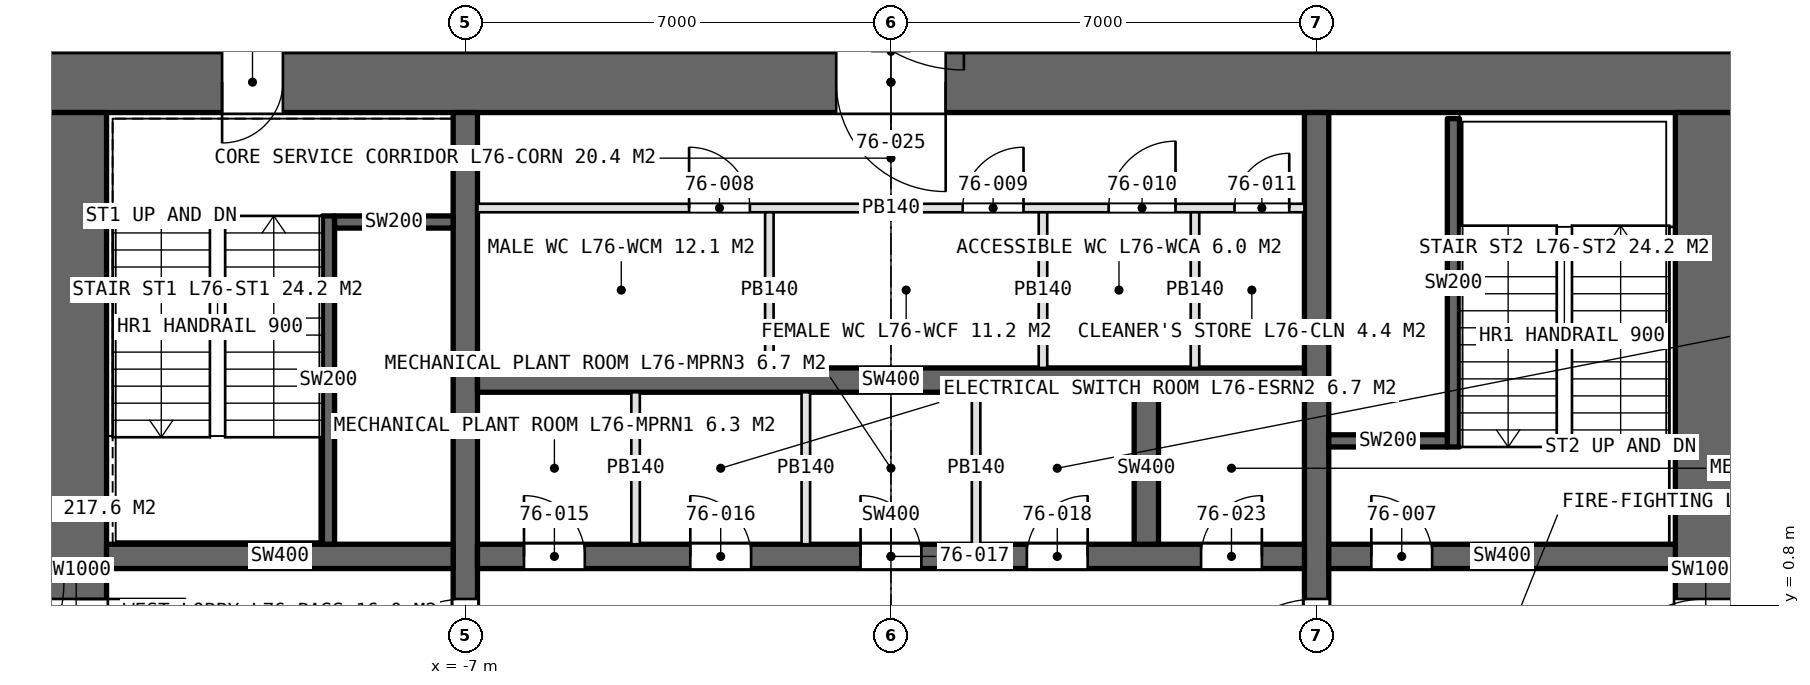
"""IFC4 building model, lengths in metres.
Left out: names, types, materials, properties, quantities, classifications, styles, units other than length and angle.
Written with IfcOpenShell. Run it as: python <this file> out.ifc"""

import sys

from ifc_helpers import new_model, si_unit, direction, frame, frame_2d, origin, place, context, subcontext, project, spatial, rectangle, extrude, element, fill, save


model = new_model("IFC4")
c1 = context("Model", 3, precision=1e-05, world=origin(), true_north=direction((0.0, 1.0)))
c2 = subcontext(c1, "Body", "Model", "MODEL_VIEW")
j1 = project(units=[si_unit("LENGTHUNIT", "METRE"), si_unit("PLANEANGLEUNIT", "RADIAN")], contexts=[c1])
p1 = place(None, origin())
s1 = spatial("IfcSite", under=j1, at=p1, CompositionType="ELEMENT")
p2 = place(p1, origin())
s2 = spatial("IfcBuilding", under=s1, at=p2, CompositionType="ELEMENT")
p3 = place(p2, frame((0.0, 0.0, 339.2)))
s3 = spatial("IfcBuildingStorey", under=s2, at=p3, CompositionType="ELEMENT", Elevation=339.2)
p4 = place(p3, frame((13.9, 9.4, 0.0), z_axis=(0.0, 0.0, 1.0), x_axis=(-1.0, 0.0, 0.0)))
e1 = element("IfcWall", 1, at=p4, inside=s3, PredefinedType="SHEAR", context=c2, shape_type="SweptSolid", body=[
    extrude(rectangle(XDim=27.8, YDim=1.0, at=frame_2d((13.9, 0.0))), origin(), (0.0, 0.0, 1.0), 5.0),
])
p5 = place(p4, frame((23.9, 0.0, 0.0)))
e2 = element("IfcOpeningElement", 2, at=p5, cuts=e1, PredefinedType="OPENING", context=c2, shape_type="SweptSolid", body=[
    extrude(rectangle(XDim=1.0, YDim=2.4, at=frame_2d((0.5, 1.2))), frame((0.0, 0.51, 0.0), z_axis=(0.0, -1.0, 0.0), x_axis=(1.0, 0.0, 0.0)), (0.0, 0.0, 1.0), 1.02),
])
p6 = place(p4, frame((13.0, 0.0, 0.0)))
e3 = element("IfcOpeningElement", 3, at=p6, cuts=e1, PredefinedType="OPENING", context=c2, shape_type="SweptSolid", body=[
    extrude(rectangle(XDim=1.8, YDim=2.4, at=frame_2d((0.9, 1.2))), frame((0.0, 0.51, 0.0), z_axis=(0.0, -1.0, 0.0), x_axis=(1.0, 0.0, 0.0)), (0.0, 0.0, 1.0), 1.02),
])
p7 = place(p3, frame((-13.4, 8.9, 0.0), z_axis=(0.0, 0.0, 1.0), x_axis=(0.0, -1.0, 0.0)))
e4 = element("IfcWall", 4, at=p7, inside=s3, PredefinedType="SHEAR", context=c2, shape_type="SweptSolid", body=[
    extrude(rectangle(XDim=17.8, YDim=1.0, at=frame_2d((8.9, 0.0))), origin(), (0.0, 0.0, 1.0), 5.0),
])
p8 = place(p7, frame((8.0, 0.0, 0.0)))
e5 = element("IfcOpeningElement", 5, at=p8, cuts=e4, PredefinedType="OPENING", context=c2, shape_type="SweptSolid", body=[
    extrude(rectangle(XDim=1.8, YDim=2.4, at=frame_2d((0.9, 1.2))), frame((0.0, 0.51, 0.0), z_axis=(0.0, -1.0, 0.0), x_axis=(1.0, 0.0, 0.0)), (0.0, 0.0, 1.0), 1.02),
])
p9 = place(p7, frame((16.6, 0.0, 0.0)))
e6 = element("IfcOpeningElement", 6, at=p9, cuts=e4, PredefinedType="OPENING", context=c2, shape_type="SweptSolid", body=[
    extrude(rectangle(XDim=1.0, YDim=2.4, at=frame_2d((0.5, 1.2))), frame((0.0, 0.51, 0.0), z_axis=(0.0, -1.0, 0.0), x_axis=(1.0, 0.0, 0.0)), (0.0, 0.0, 1.0), 1.02),
])
p10 = place(p3, frame((13.4, -8.9, 0.0), z_axis=(0.0, 0.0, 1.0), x_axis=(0.0, 1.0, 0.0)))
e7 = element("IfcWall", 7, at=p10, inside=s3, PredefinedType="SHEAR", context=c2, shape_type="SweptSolid", body=[
    extrude(rectangle(XDim=17.8, YDim=1.0, at=frame_2d((8.9, 0.0))), origin(), (0.0, 0.0, 1.0), 5.0),
])
p11 = place(p10, frame((8.0, 0.0, 0.0)))
e8 = element("IfcOpeningElement", 8, at=p11, cuts=e7, PredefinedType="OPENING", context=c2, shape_type="SweptSolid", body=[
    extrude(rectangle(XDim=1.8, YDim=2.4, at=frame_2d((0.9, 1.2))), frame((0.0, 0.51, 0.0), z_axis=(0.0, -1.0, 0.0), x_axis=(1.0, 0.0, 0.0)), (0.0, 0.0, 1.0), 1.02),
])
p12 = place(p3, frame((-7.0, -8.9, 0.0), z_axis=(0.0, 0.0, 1.0), x_axis=(0.0, 1.0, 0.0)))
e9 = element("IfcWall", 9, at=p12, inside=s3, PredefinedType="SHEAR", context=c2, shape_type="SweptSolid", body=[
    extrude(rectangle(XDim=17.8, YDim=0.4, at=frame_2d((8.9, 0.0))), origin(), (0.0, 0.0, 1.0), 5.0),
])
p13 = place(p12, frame((8.0, 0.0, 0.0)))
e10 = element("IfcOpeningElement", 10, at=p13, cuts=e9, PredefinedType="OPENING", context=c2, shape_type="SweptSolid", body=[
    extrude(rectangle(XDim=1.8, YDim=2.4, at=frame_2d((0.9, 1.2))), frame((0.0, 0.21, 0.0), z_axis=(0.0, -1.0, 0.0), x_axis=(1.0, 0.0, 0.0)), (0.0, 0.0, 1.0), 0.42),
])
p14 = place(p3, frame((7.0, -8.9, 0.0), z_axis=(0.0, 0.0, 1.0), x_axis=(0.0, 1.0, 0.0)))
e11 = element("IfcWall", 11, at=p14, inside=s3, PredefinedType="SHEAR", context=c2, shape_type="SweptSolid", body=[
    extrude(rectangle(XDim=17.8, YDim=0.4, at=frame_2d((8.9, 0.0))), origin(), (0.0, 0.0, 1.0), 5.0),
])
p15 = place(p14, frame((8.0, 0.0, 0.0)))
e12 = element("IfcOpeningElement", 12, at=p15, cuts=e11, PredefinedType="OPENING", context=c2, shape_type="SweptSolid", body=[
    extrude(rectangle(XDim=1.8, YDim=2.4, at=frame_2d((0.9, 1.2))), frame((0.0, 0.21, 0.0), z_axis=(0.0, -1.0, 0.0), x_axis=(1.0, 0.0, 0.0)), (0.0, 0.0, 1.0), 0.42),
])
p16 = place(p3, frame((-6.8, 1.6, 0.0), z_axis=(0.0, 0.0, 1.0), x_axis=(1.0, 0.0, 0.0)))
e13 = element("IfcWall", 13, at=p16, inside=s3, PredefinedType="SHEAR", context=c2, shape_type="SweptSolid", body=[
    extrude(rectangle(XDim=13.6, YDim=0.4, at=frame_2d((6.8, 0.0))), origin(), (0.0, 0.0, 1.0), 5.0),
])
p17 = place(p16, frame((0.765, 0.0, 0.0)))
e14 = element("IfcOpeningElement", 14, at=p17, cuts=e13, PredefinedType="OPENING", context=c2, shape_type="SweptSolid", body=[
    extrude(rectangle(XDim=1.0, YDim=2.4, at=frame_2d((0.5, 1.2))), frame((0.0, 0.21, 0.0), z_axis=(0.0, -1.0, 0.0), x_axis=(1.0, 0.0, 0.0)), (0.0, 0.0, 1.0), 0.42),
])
p18 = place(p16, frame((3.5, 0.0, 0.0)))
e15 = element("IfcOpeningElement", 15, at=p18, cuts=e13, PredefinedType="OPENING", context=c2, shape_type="SweptSolid", body=[
    extrude(rectangle(XDim=1.0, YDim=2.4, at=frame_2d((0.5, 1.2))), frame((0.0, 0.21, 0.0), z_axis=(0.0, -1.0, 0.0), x_axis=(1.0, 0.0, 0.0)), (0.0, 0.0, 1.0), 0.42),
])
p19 = place(p16, frame((6.3, 0.0, 0.0)))
e16 = element("IfcOpeningElement", 16, at=p19, cuts=e13, PredefinedType="OPENING", context=c2, shape_type="SweptSolid", body=[
    extrude(rectangle(XDim=1.0, YDim=2.4, at=frame_2d((0.5, 1.2))), frame((0.0, 0.21, 0.0), z_axis=(0.0, -1.0, 0.0), x_axis=(1.0, 0.0, 0.0)), (0.0, 0.0, 1.0), 0.42),
])
p20 = place(p16, frame((9.035, 0.0, 0.0)))
e17 = element("IfcOpeningElement", 17, at=p20, cuts=e13, PredefinedType="OPENING", context=c2, shape_type="SweptSolid", body=[
    extrude(rectangle(XDim=1.0, YDim=2.4, at=frame_2d((0.5, 1.2))), frame((0.0, 0.21, 0.0), z_axis=(0.0, -1.0, 0.0), x_axis=(1.0, 0.0, 0.0)), (0.0, 0.0, 1.0), 0.42),
])
p21 = place(p16, frame((11.9, 0.0, 0.0)))
e18 = element("IfcOpeningElement", 18, at=p21, cuts=e13, PredefinedType="OPENING", context=c2, shape_type="SweptSolid", body=[
    extrude(rectangle(XDim=1.0, YDim=2.4, at=frame_2d((0.5, 1.2))), frame((0.0, 0.21, 0.0), z_axis=(0.0, -1.0, 0.0), x_axis=(1.0, 0.0, 0.0)), (0.0, 0.0, 1.0), 0.42),
])
p22 = place(p3, frame((-6.8, 4.5, 0.0), z_axis=(0.0, 0.0, 1.0), x_axis=(1.0, 0.0, 0.0)))
e19 = element("IfcWall", 19, at=p22, inside=s3, PredefinedType="SHEAR", context=c2, shape_type="SweptSolid", body=[
    extrude(rectangle(XDim=13.6, YDim=0.4, at=frame_2d((6.8, 0.0))), origin(), (0.0, 0.0, 1.0), 5.0),
])
p23 = place(p3, frame((-12.9, 1.6, 0.0), z_axis=(0.0, 0.0, 1.0), x_axis=(1.0, 0.0, 0.0)))
e20 = element("IfcWall", 20, at=p23, inside=s3, PredefinedType="SHEAR", context=c2, shape_type="SweptSolid", body=[
    extrude(rectangle(XDim=5.7, YDim=0.4, at=frame_2d((2.85, 0.0))), origin(), (0.0, 0.0, 1.0), 5.0),
])
p24 = place(p3, frame((7.2, 1.6, 0.0), z_axis=(0.0, 0.0, 1.0), x_axis=(1.0, 0.0, 0.0)))
e21 = element("IfcWall", 21, at=p24, inside=s3, PredefinedType="SHEAR", context=c2, shape_type="SweptSolid", body=[
    extrude(rectangle(XDim=5.7, YDim=0.4, at=frame_2d((2.85, 0.0))), origin(), (0.0, 0.0, 1.0), 5.0),
])
p25 = place(p24, frame((0.7, 0.0, 0.0)))
e22 = element("IfcOpeningElement", 22, at=p25, cuts=e21, PredefinedType="OPENING", context=c2, shape_type="SweptSolid", body=[
    extrude(rectangle(XDim=1.0, YDim=2.4, at=frame_2d((0.5, 1.2))), frame((0.0, 0.21, 0.0), z_axis=(0.0, -1.0, 0.0), x_axis=(1.0, 0.0, 0.0)), (0.0, 0.0, 1.0), 0.42),
])
p26 = place(p3, frame((4.2, 1.8, 0.0), z_axis=(0.0, 0.0, 1.0), x_axis=(0.0, 1.0, 0.0)))
e23 = element("IfcWall", 23, at=p26, inside=s3, PredefinedType="SHEAR", context=c2, shape_type="SweptSolid", body=[
    extrude(rectangle(XDim=2.5, YDim=0.4, at=frame_2d((1.25, 0.0))), origin(), (0.0, 0.0, 1.0), 5.0),
])
p27 = place(p3, frame((-6.8, 7.33, 0.0), z_axis=(0.0, 0.0, 1.0), x_axis=(1.0, 0.0, 0.0)))
e24 = element("IfcWall", 24, at=p27, inside=s3, PredefinedType="PARTITIONING", context=c2, shape_type="SweptSolid", body=[
    extrude(rectangle(XDim=13.6, YDim=0.14, at=frame_2d((6.8, 0.0))), origin(), (0.0, 0.0, 1.0), 4.75),
])
p28 = place(p27, frame((3.48, 0.0, 0.0)))
e25 = element("IfcOpeningElement", 25, at=p28, cuts=e24, PredefinedType="OPENING", context=c2, shape_type="SweptSolid", body=[
    extrude(rectangle(XDim=1.0, YDim=2.4, at=frame_2d((0.5, 1.2))), frame((0.0, 0.08, 0.0), z_axis=(0.0, -1.0, 0.0), x_axis=(1.0, 0.0, 0.0)), (0.0, 0.0, 1.0), 0.16),
])
p29 = place(p27, frame((7.98, 0.0, 0.0)))
e26 = element("IfcOpeningElement", 26, at=p29, cuts=e24, PredefinedType="OPENING", context=c2, shape_type="SweptSolid", body=[
    extrude(rectangle(XDim=1.0, YDim=2.4, at=frame_2d((0.5, 1.2))), frame((0.0, 0.08, 0.0), z_axis=(0.0, -1.0, 0.0), x_axis=(1.0, 0.0, 0.0)), (0.0, 0.0, 1.0), 0.16),
])
p30 = place(p27, frame((10.38, 0.0, 0.0)))
e27 = element("IfcOpeningElement", 27, at=p30, cuts=e24, PredefinedType="OPENING", context=c2, shape_type="SweptSolid", body=[
    extrude(rectangle(XDim=1.1, YDim=2.4, at=frame_2d((0.55, 1.2))), frame((0.0, 0.08, 0.0), z_axis=(0.0, -1.0, 0.0), x_axis=(1.0, 0.0, 0.0)), (0.0, 0.0, 1.0), 0.16),
])
p31 = place(p27, frame((12.45, 0.0, 0.0)))
e28 = element("IfcOpeningElement", 28, at=p31, cuts=e24, PredefinedType="OPENING", context=c2, shape_type="SweptSolid", body=[
    extrude(rectangle(XDim=0.9, YDim=2.4, at=frame_2d((0.45, 1.2))), frame((0.0, 0.08, 0.0), z_axis=(0.0, -1.0, 0.0), x_axis=(1.0, 0.0, 0.0)), (0.0, 0.0, 1.0), 0.16),
])
for number, where, z_axis, x_axis in (
    (29, (-2.0, 4.7, 0.0), (0.0, 0.0, 1.0), (0.0, 1.0, 0.0)),
    (30, (2.5, 4.7, 0.0), (0.0, 0.0, 1.0), (0.0, 1.0, 0.0)),
    (31, (5.0, 4.7, 0.0), (0.0, 0.0, 1.0), (0.0, 1.0, 0.0)),
):
    element("IfcWall", number, at=place(p3, frame(where, z_axis=z_axis, x_axis=x_axis)), inside=s3, PredefinedType="PARTITIONING", context=c2, shape_type="SweptSolid", body=[
        extrude(rectangle(XDim=2.56, YDim=0.14, at=frame_2d((1.28, 0.0))), origin(), (0.0, 0.0, 1.0), 4.75),
    ])
for number, where, z_axis, x_axis in (
    (32, (-4.2, 1.8, 0.0), (0.0, 0.0, 1.0), (0.0, 1.0, 0.0)),
    (33, (-1.4, 1.8, 0.0), (0.0, 0.0, 1.0), (0.0, 1.0, 0.0)),
    (34, (1.4, 1.8, 0.0), (0.0, 0.0, 1.0), (0.0, 1.0, 0.0)),
):
    element("IfcWall", number, at=place(p3, frame(where, z_axis=z_axis, x_axis=x_axis)), inside=s3, PredefinedType="PARTITIONING", context=c2, shape_type="SweptSolid", body=[
        extrude(rectangle(XDim=2.5, YDim=0.14, at=frame_2d((1.25, 0.0))), origin(), (0.0, 0.0, 1.0), 4.75),
    ])
p32 = place(p3, frame((-9.25, 7.2, 0.0), z_axis=(0.0, 0.0, 1.0), x_axis=(0.0, -1.0, 0.0)))
e35 = element("IfcWall", 35, at=p32, inside=s3, PredefinedType="SOLIDWALL", context=c2, shape_type="SweptSolid", body=[
    extrude(rectangle(XDim=5.4, YDim=0.2, at=frame_2d((2.7, 0.0))), origin(), (0.0, 0.0, 1.0), 5.0),
])
p33 = place(p3, frame((-9.15, 7.1, 0.0), z_axis=(0.0, 0.0, 1.0), x_axis=(1.0, 0.0, 0.0)))
e36 = element("IfcWall", 36, at=p33, inside=s3, PredefinedType="SOLIDWALL", context=c2, shape_type="SweptSolid", body=[
    extrude(rectangle(XDim=1.95, YDim=0.2, at=frame_2d((0.975, 0.0))), origin(), (0.0, 0.0, 1.0), 5.0),
])
p34 = place(p3, frame((9.25, 3.4, 0.0), z_axis=(0.0, 0.0, 1.0), x_axis=(0.0, 1.0, 0.0)))
e37 = element("IfcWall", 37, at=p34, inside=s3, PredefinedType="SOLIDWALL", context=c2, shape_type="SweptSolid", body=[
    extrude(rectangle(XDim=5.4, YDim=0.2, at=frame_2d((2.7, 0.0))), origin(), (0.0, 0.0, 1.0), 5.0),
])
p35 = place(p3, frame((9.15, 3.5, 0.0), z_axis=(0.0, 0.0, 1.0), x_axis=(-1.0, 0.0, 0.0)))
e38 = element("IfcWall", 38, at=p35, inside=s3, PredefinedType="SOLIDWALL", context=c2, shape_type="SweptSolid", body=[
    extrude(rectangle(XDim=1.95, YDim=0.2, at=frame_2d((0.975, 0.0))), origin(), (0.0, 0.0, 1.0), 5.0),
])
p36 = place(p8, origin())
e39 = element("IfcDoor", 39, at=p36, inside=s3, OperationType="DOUBLE_DOOR_SINGLE_SWING", PredefinedType="DOOR", context=c2, shape_type="SweptSolid", body=[
    extrude(rectangle(XDim=1.8, YDim=2.4, at=frame_2d((0.9, 1.2))), frame((0.0, 0.025, 0.0), z_axis=(0.0, -1.0, 0.0), x_axis=(1.0, 0.0, 0.0)), (0.0, 0.0, 1.0), 0.05),
])
fill(e5, e39)
p37 = place(p11, origin())
e40 = element("IfcDoor", 40, at=p37, inside=s3, OperationType="DOUBLE_DOOR_SINGLE_SWING", PredefinedType="DOOR", context=c2, shape_type="SweptSolid", body=[
    extrude(rectangle(XDim=1.8, YDim=2.4, at=frame_2d((0.9, 1.2))), frame((0.0, 0.025, 0.0), z_axis=(0.0, -1.0, 0.0), x_axis=(1.0, 0.0, 0.0)), (0.0, 0.0, 1.0), 0.05),
])
fill(e8, e40)
p38 = place(p13, origin())
e41 = element("IfcDoor", 41, at=p38, inside=s3, OperationType="DOUBLE_DOOR_SINGLE_SWING", PredefinedType="DOOR", context=c2, shape_type="SweptSolid", body=[
    extrude(rectangle(XDim=1.8, YDim=2.4, at=frame_2d((0.9, 1.2))), frame((0.0, 0.025, 0.0), z_axis=(0.0, -1.0, 0.0), x_axis=(1.0, 0.0, 0.0)), (0.0, 0.0, 1.0), 0.05),
])
fill(e10, e41)
p39 = place(p15, origin())
e42 = element("IfcDoor", 42, at=p39, inside=s3, OperationType="DOUBLE_DOOR_SINGLE_SWING", PredefinedType="DOOR", context=c2, shape_type="SweptSolid", body=[
    extrude(rectangle(XDim=1.8, YDim=2.4, at=frame_2d((0.9, 1.2))), frame((0.0, 0.025, 0.0), z_axis=(0.0, -1.0, 0.0), x_axis=(1.0, 0.0, 0.0)), (0.0, 0.0, 1.0), 0.05),
])
fill(e12, e42)
p40 = place(p5, origin())
e43 = element("IfcDoor", 43, at=p40, inside=s3, OperationType="SINGLE_SWING_RIGHT", PredefinedType="DOOR", context=c2, shape_type="SweptSolid", body=[
    extrude(rectangle(XDim=1.0, YDim=2.4, at=frame_2d((0.5, 1.2))), frame((0.0, 0.025, 0.0), z_axis=(0.0, -1.0, 0.0), x_axis=(1.0, 0.0, 0.0)), (0.0, 0.0, 1.0), 0.05),
])
fill(e2, e43)
p41 = place(p25, origin())
e44 = element("IfcDoor", 44, at=p41, inside=s3, OperationType="SINGLE_SWING_LEFT", PredefinedType="DOOR", context=c2, shape_type="SweptSolid", body=[
    extrude(rectangle(XDim=1.0, YDim=2.4, at=frame_2d((0.5, 1.2))), frame((0.0, 0.025, 0.0), z_axis=(0.0, -1.0, 0.0), x_axis=(1.0, 0.0, 0.0)), (0.0, 0.0, 1.0), 0.05),
])
fill(e22, e44)
p42 = place(p28, origin())
e45 = element("IfcDoor", 45, at=p42, inside=s3, OperationType="SINGLE_SWING_LEFT", PredefinedType="DOOR", context=c2, shape_type="SweptSolid", body=[
    extrude(rectangle(XDim=1.0, YDim=2.4, at=frame_2d((0.5, 1.2))), frame((0.0, 0.025, 0.0), z_axis=(0.0, -1.0, 0.0), x_axis=(1.0, 0.0, 0.0)), (0.0, 0.0, 1.0), 0.05),
])
fill(e25, e45)
p43 = place(p29, origin())
e46 = element("IfcDoor", 46, at=p43, inside=s3, OperationType="SINGLE_SWING_RIGHT", PredefinedType="DOOR", context=c2, shape_type="SweptSolid", body=[
    extrude(rectangle(XDim=1.0, YDim=2.4, at=frame_2d((0.5, 1.2))), frame((0.0, 0.025, 0.0), z_axis=(0.0, -1.0, 0.0), x_axis=(1.0, 0.0, 0.0)), (0.0, 0.0, 1.0), 0.05),
])
fill(e26, e46)
p44 = place(p30, origin())
e47 = element("IfcDoor", 47, at=p44, inside=s3, OperationType="SINGLE_SWING_RIGHT", PredefinedType="DOOR", context=c2, shape_type="SweptSolid", body=[
    extrude(rectangle(XDim=1.1, YDim=2.4, at=frame_2d((0.55, 1.2))), frame((0.0, 0.025, 0.0), z_axis=(0.0, -1.0, 0.0), x_axis=(1.0, 0.0, 0.0)), (0.0, 0.0, 1.0), 0.05),
])
fill(e27, e47)
p45 = place(p31, origin())
e48 = element("IfcDoor", 48, at=p45, inside=s3, OperationType="SINGLE_SWING_RIGHT", PredefinedType="DOOR", context=c2, shape_type="SweptSolid", body=[
    extrude(rectangle(XDim=0.9, YDim=2.4, at=frame_2d((0.45, 1.2))), frame((0.0, 0.025, 0.0), z_axis=(0.0, -1.0, 0.0), x_axis=(1.0, 0.0, 0.0)), (0.0, 0.0, 1.0), 0.05),
])
fill(e28, e48)
p46 = place(p17, origin())
e49 = element("IfcDoor", 49, at=p46, inside=s3, OperationType="SINGLE_SWING_LEFT", PredefinedType="DOOR", context=c2, shape_type="SweptSolid", body=[
    extrude(rectangle(XDim=1.0, YDim=2.4, at=frame_2d((0.5, 1.2))), frame((0.0, 0.025, 0.0), z_axis=(0.0, -1.0, 0.0), x_axis=(1.0, 0.0, 0.0)), (0.0, 0.0, 1.0), 0.05),
])
fill(e14, e49)
p47 = place(p18, origin())
e50 = element("IfcDoor", 50, at=p47, inside=s3, OperationType="SINGLE_SWING_LEFT", PredefinedType="DOOR", context=c2, shape_type="SweptSolid", body=[
    extrude(rectangle(XDim=1.0, YDim=2.4, at=frame_2d((0.5, 1.2))), frame((0.0, 0.025, 0.0), z_axis=(0.0, -1.0, 0.0), x_axis=(1.0, 0.0, 0.0)), (0.0, 0.0, 1.0), 0.05),
])
fill(e15, e50)
p48 = place(p19, origin())
e51 = element("IfcDoor", 51, at=p48, inside=s3, OperationType="SINGLE_SWING_LEFT", PredefinedType="DOOR", context=c2, shape_type="SweptSolid", body=[
    extrude(rectangle(XDim=1.0, YDim=2.4, at=frame_2d((0.5, 1.2))), frame((0.0, 0.025, 0.0), z_axis=(0.0, -1.0, 0.0), x_axis=(1.0, 0.0, 0.0)), (0.0, 0.0, 1.0), 0.05),
])
fill(e16, e51)
p49 = place(p20, origin())
e52 = element("IfcDoor", 52, at=p49, inside=s3, OperationType="SINGLE_SWING_RIGHT", PredefinedType="DOOR", context=c2, shape_type="SweptSolid", body=[
    extrude(rectangle(XDim=1.0, YDim=2.4, at=frame_2d((0.5, 1.2))), frame((0.0, 0.025, 0.0), z_axis=(0.0, -1.0, 0.0), x_axis=(1.0, 0.0, 0.0)), (0.0, 0.0, 1.0), 0.05),
])
fill(e17, e52)
p50 = place(p21, origin())
e53 = element("IfcDoor", 53, at=p50, inside=s3, OperationType="SINGLE_SWING_RIGHT", PredefinedType="DOOR", context=c2, shape_type="SweptSolid", body=[
    extrude(rectangle(XDim=1.0, YDim=2.4, at=frame_2d((0.5, 1.2))), frame((0.0, 0.025, 0.0), z_axis=(0.0, -1.0, 0.0), x_axis=(1.0, 0.0, 0.0)), (0.0, 0.0, 1.0), 0.05),
])
fill(e18, e53)
p51 = place(p6, origin())
e54 = element("IfcDoor", 54, at=p51, inside=s3, OperationType="DOUBLE_DOOR_SINGLE_SWING", PredefinedType="DOOR", context=c2, shape_type="SweptSolid", body=[
    extrude(rectangle(XDim=1.8, YDim=2.4, at=frame_2d((0.9, 1.2))), frame((0.0, 0.025, 0.0), z_axis=(0.0, -1.0, 0.0), x_axis=(1.0, 0.0, 0.0)), (0.0, 0.0, 1.0), 0.05),
])
fill(e3, e54)
save(model, sys.argv[1])
